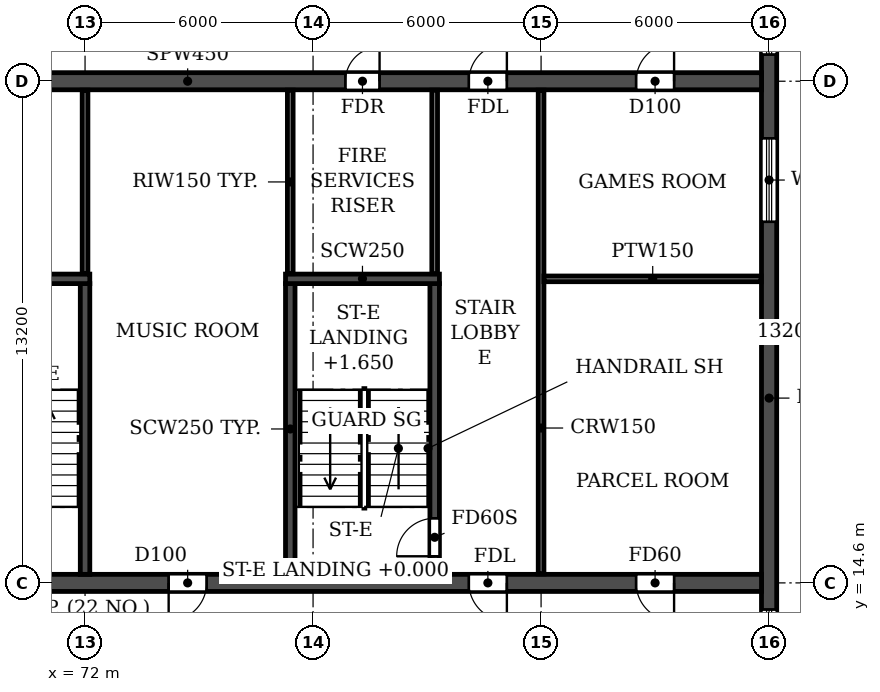
"""IFC4 building model, lengths in metres.
Left out: names, types, materials, properties, quantities, classifications, styles, units other than length and angle.
Written with IfcOpenShell. Run it as: python <this file> out.ifc"""

import sys

from ifc_helpers import new_model, si_unit, direction, frame, frame_2d, origin, place, context, subcontext, project, spatial, rectangle, extrude, element, fill, save


model = new_model("IFC4")
c1 = context("Model", 3, precision=1e-05, world=origin(), true_north=direction((0.0, 1.0)))
c2 = subcontext(c1, "Body", "Model", "MODEL_VIEW")
j1 = project(units=[si_unit("LENGTHUNIT", "METRE"), si_unit("PLANEANGLEUNIT", "RADIAN")], contexts=[c1])
p1 = place(None, origin())
s1 = spatial("IfcSite", under=j1, at=p1, CompositionType="ELEMENT")
p2 = place(p1, origin())
s2 = spatial("IfcBuilding", under=s1, at=p2, CompositionType="ELEMENT")
p3 = place(p2, frame((0.0, 0.0, 152.1)))
s3 = spatial("IfcBuildingStorey", under=s2, at=p3, CompositionType="ELEMENT", Elevation=152.1)
p4 = place(p3, frame((90.0, 4.683, 0.0), z_axis=(0.0, 0.0, 1.0), x_axis=(0.0, 1.0, 0.0)))
e1 = element("IfcWall", 1, at=p4, inside=s3, PredefinedType="SHEAR", context=c2, shape_type="SweptSolid", body=[
    extrude(rectangle(XDim=33.034, YDim=0.4, at=frame_2d((16.517, 0.0))), origin(), (0.0, 0.0, 1.0), 3.07),
])
p5 = place(p4, frame((23.817, 0.0, 0.9)))
e2 = element("IfcOpeningElement", 2, at=p5, cuts=e1, PredefinedType="OPENING", context=c2, shape_type="SweptSolid", body=[
    extrude(rectangle(XDim=1.2, YDim=1.5, at=frame_2d((0.6, 0.75))), frame((0.0, 0.21, 0.0), z_axis=(0.0, -1.0, 0.0), x_axis=(1.0, 0.0, 0.0)), (0.0, 0.0, 1.0), 0.42),
])
p6 = place(p4, frame((8.017, 0.0, 0.9)))
e3 = element("IfcOpeningElement", 3, at=p6, cuts=e1, PredefinedType="OPENING", context=c2, shape_type="SweptSolid", body=[
    extrude(rectangle(XDim=1.2, YDim=1.5, at=frame_2d((0.6, 0.75))), frame((0.0, 0.21, 0.0), z_axis=(0.0, -1.0, 0.0), x_axis=(1.0, 0.0, 0.0)), (0.0, 0.0, 1.0), 0.42),
])
p7 = place(p4, frame((28.293, 0.0, 0.6)))
e4 = element("IfcOpeningElement", 4, at=p7, cuts=e1, PredefinedType="OPENING", context=c2, shape_type="SweptSolid", body=[
    extrude(rectangle(XDim=2.2, YDim=1.8, at=frame_2d((1.1, 0.9))), frame((0.0, 0.21, 0.0), z_axis=(0.0, -1.0, 0.0), x_axis=(1.0, 0.0, 0.0)), (0.0, 0.0, 1.0), 0.42),
])
p8 = place(p4, frame((2.541, 0.0, 0.6)))
e5 = element("IfcOpeningElement", 5, at=p8, cuts=e1, PredefinedType="OPENING", context=c2, shape_type="SweptSolid", body=[
    extrude(rectangle(XDim=2.2, YDim=1.8, at=frame_2d((1.1, 0.9))), frame((0.0, 0.21, 0.0), z_axis=(0.0, -1.0, 0.0), x_axis=(1.0, 0.0, 0.0)), (0.0, 0.0, 1.0), 0.42),
])
p9 = place(p4, frame((19.417, 0.0, 0.6)))
e6 = element("IfcOpeningElement", 6, at=p9, cuts=e1, PredefinedType="OPENING", context=c2, shape_type="SweptSolid", body=[
    extrude(rectangle(XDim=2.2, YDim=1.8, at=frame_2d((1.1, 0.9))), frame((0.0, 0.21, 0.0), z_axis=(0.0, -1.0, 0.0), x_axis=(1.0, 0.0, 0.0)), (0.0, 0.0, 1.0), 0.42),
])
p10 = place(p3, frame((12.2, 14.6, 0.0), z_axis=(0.0, 0.0, 1.0), x_axis=(1.0, 0.0, 0.0)))
e7 = element("IfcWall", 7, at=p10, inside=s3, PredefinedType="SOLIDWALL", context=c2, shape_type="SweptSolid", body=[
    extrude(rectangle(XDim=77.6, YDim=0.45, at=frame_2d((38.8, 0.0))), origin(), (0.0, 0.0, 1.0), 3.07),
])
p11 = place(p10, frame((2.3, 0.0, 0.0)))
e8 = element("IfcOpeningElement", 8, at=p11, cuts=e7, PredefinedType="OPENING", context=c2, shape_type="SweptSolid", body=[
    extrude(rectangle(XDim=1.0, YDim=2.1, at=frame_2d((0.5, 1.05))), frame((0.0, 0.235, 0.0), z_axis=(0.0, -1.0, 0.0), x_axis=(1.0, 0.0, 0.0)), (0.0, 0.0, 1.0), 0.47),
])
p12 = place(p10, frame((6.7, 0.0, 0.0)))
e9 = element("IfcOpeningElement", 9, at=p12, cuts=e7, PredefinedType="OPENING", context=c2, shape_type="SweptSolid", body=[
    extrude(rectangle(XDim=1.0, YDim=2.1, at=frame_2d((0.5, 1.05))), frame((0.0, 0.235, 0.0), z_axis=(0.0, -1.0, 0.0), x_axis=(1.0, 0.0, 0.0)), (0.0, 0.0, 1.0), 0.47),
])
p13 = place(p10, frame((14.6, 0.0, 0.0)))
e10 = element("IfcOpeningElement", 10, at=p13, cuts=e7, PredefinedType="OPENING", context=c2, shape_type="SweptSolid", body=[
    extrude(rectangle(XDim=1.0, YDim=2.1, at=frame_2d((0.5, 1.05))), frame((0.0, 0.235, 0.0), z_axis=(0.0, -1.0, 0.0), x_axis=(1.0, 0.0, 0.0)), (0.0, 0.0, 1.0), 0.47),
])
p14 = place(p10, frame((19.2, 0.0, 0.0)))
e11 = element("IfcOpeningElement", 11, at=p14, cuts=e7, PredefinedType="OPENING", context=c2, shape_type="SweptSolid", body=[
    extrude(rectangle(XDim=1.0, YDim=2.1, at=frame_2d((0.5, 1.05))), frame((0.0, 0.235, 0.0), z_axis=(0.0, -1.0, 0.0), x_axis=(1.0, 0.0, 0.0)), (0.0, 0.0, 1.0), 0.47),
])
p15 = place(p10, frame((30.5, 0.0, 0.0)))
e12 = element("IfcOpeningElement", 12, at=p15, cuts=e7, PredefinedType="OPENING", context=c2, shape_type="SweptSolid", body=[
    extrude(rectangle(XDim=1.0, YDim=2.1, at=frame_2d((0.5, 1.05))), frame((0.0, 0.235, 0.0), z_axis=(0.0, -1.0, 0.0), x_axis=(1.0, 0.0, 0.0)), (0.0, 0.0, 1.0), 0.47),
])
p16 = place(p10, frame((34.15, 0.0, 0.0)))
e13 = element("IfcOpeningElement", 13, at=p16, cuts=e7, PredefinedType="OPENING", context=c2, shape_type="SweptSolid", body=[
    extrude(rectangle(XDim=1.5, YDim=2.1, at=frame_2d((0.75, 1.05))), frame((0.0, 0.235, 0.0), z_axis=(0.0, -1.0, 0.0), x_axis=(1.0, 0.0, 0.0)), (0.0, 0.0, 1.0), 0.47),
])
p17 = place(p10, frame((38.3, 0.0, 0.0)))
e14 = element("IfcOpeningElement", 14, at=p17, cuts=e7, PredefinedType="OPENING", context=c2, shape_type="SweptSolid", body=[
    extrude(rectangle(XDim=1.0, YDim=2.1, at=frame_2d((0.5, 1.05))), frame((0.0, 0.235, 0.0), z_axis=(0.0, -1.0, 0.0), x_axis=(1.0, 0.0, 0.0)), (0.0, 0.0, 1.0), 0.47),
])
p18 = place(p10, frame((43.5, 0.0, 0.0)))
e15 = element("IfcOpeningElement", 15, at=p18, cuts=e7, PredefinedType="OPENING", context=c2, shape_type="SweptSolid", body=[
    extrude(rectangle(XDim=1.0, YDim=2.1, at=frame_2d((0.5, 1.05))), frame((0.0, 0.235, 0.0), z_axis=(0.0, -1.0, 0.0), x_axis=(1.0, 0.0, 0.0)), (0.0, 0.0, 1.0), 0.47),
])
p19 = place(p10, frame((57.4, 0.0, 0.0)))
e16 = element("IfcOpeningElement", 16, at=p19, cuts=e7, PredefinedType="OPENING", context=c2, shape_type="SweptSolid", body=[
    extrude(rectangle(XDim=1.0, YDim=2.1, at=frame_2d((0.5, 1.05))), frame((0.0, 0.235, 0.0), z_axis=(0.0, -1.0, 0.0), x_axis=(1.0, 0.0, 0.0)), (0.0, 0.0, 1.0), 0.47),
])
p20 = place(p10, frame((62.0, 0.0, 0.0)))
e17 = element("IfcOpeningElement", 17, at=p20, cuts=e7, PredefinedType="OPENING", context=c2, shape_type="SweptSolid", body=[
    extrude(rectangle(XDim=1.0, YDim=2.1, at=frame_2d((0.5, 1.05))), frame((0.0, 0.235, 0.0), z_axis=(0.0, -1.0, 0.0), x_axis=(1.0, 0.0, 0.0)), (0.0, 0.0, 1.0), 0.47),
])
p21 = place(p10, frame((69.9, 0.0, 0.0)))
e18 = element("IfcOpeningElement", 18, at=p21, cuts=e7, PredefinedType="OPENING", context=c2, shape_type="SweptSolid", body=[
    extrude(rectangle(XDim=1.0, YDim=2.1, at=frame_2d((0.5, 1.05))), frame((0.0, 0.235, 0.0), z_axis=(0.0, -1.0, 0.0), x_axis=(1.0, 0.0, 0.0)), (0.0, 0.0, 1.0), 0.47),
])
p22 = place(p10, frame((74.3, 0.0, 0.0)))
e19 = element("IfcOpeningElement", 19, at=p22, cuts=e7, PredefinedType="OPENING", context=c2, shape_type="SweptSolid", body=[
    extrude(rectangle(XDim=1.0, YDim=2.1, at=frame_2d((0.5, 1.05))), frame((0.0, 0.235, 0.0), z_axis=(0.0, -1.0, 0.0), x_axis=(1.0, 0.0, 0.0)), (0.0, 0.0, 1.0), 0.47),
])
p23 = place(p3, frame((12.2, 27.8, 0.0), z_axis=(0.0, 0.0, 1.0), x_axis=(1.0, 0.0, 0.0)))
e20 = element("IfcWall", 20, at=p23, inside=s3, PredefinedType="SOLIDWALL", context=c2, shape_type="SweptSolid", body=[
    extrude(rectangle(XDim=77.6, YDim=0.45, at=frame_2d((38.8, 0.0))), origin(), (0.0, 0.0, 1.0), 3.07),
])
p24 = place(p23, frame((2.3, 0.0, 0.0)))
e21 = element("IfcOpeningElement", 21, at=p24, cuts=e20, PredefinedType="OPENING", context=c2, shape_type="SweptSolid", body=[
    extrude(rectangle(XDim=1.0, YDim=2.1, at=frame_2d((0.5, 1.05))), frame((0.0, 0.235, 0.0), z_axis=(0.0, -1.0, 0.0), x_axis=(1.0, 0.0, 0.0)), (0.0, 0.0, 1.0), 0.47),
])
p25 = place(p23, frame((6.7, 0.0, 0.0)))
e22 = element("IfcOpeningElement", 22, at=p25, cuts=e20, PredefinedType="OPENING", context=c2, shape_type="SweptSolid", body=[
    extrude(rectangle(XDim=1.0, YDim=2.1, at=frame_2d((0.5, 1.05))), frame((0.0, 0.235, 0.0), z_axis=(0.0, -1.0, 0.0), x_axis=(1.0, 0.0, 0.0)), (0.0, 0.0, 1.0), 0.47),
])
p26 = place(p23, frame((10.05, 0.0, 0.0)))
e23 = element("IfcOpeningElement", 23, at=p26, cuts=e20, PredefinedType="OPENING", context=c2, shape_type="SweptSolid", body=[
    extrude(rectangle(XDim=0.9, YDim=2.1, at=frame_2d((0.45, 1.05))), frame((0.0, 0.235, 0.0), z_axis=(0.0, -1.0, 0.0), x_axis=(1.0, 0.0, 0.0)), (0.0, 0.0, 1.0), 0.47),
])
p27 = place(p23, frame((19.25, 0.0, 0.0)))
e24 = element("IfcOpeningElement", 24, at=p27, cuts=e20, PredefinedType="OPENING", context=c2, shape_type="SweptSolid", body=[
    extrude(rectangle(XDim=0.9, YDim=2.1, at=frame_2d((0.45, 1.05))), frame((0.0, 0.235, 0.0), z_axis=(0.0, -1.0, 0.0), x_axis=(1.0, 0.0, 0.0)), (0.0, 0.0, 1.0), 0.47),
])
p28 = place(p23, frame((22.4, 0.0, 0.0)))
e25 = element("IfcOpeningElement", 25, at=p28, cuts=e20, PredefinedType="OPENING", context=c2, shape_type="SweptSolid", body=[
    extrude(rectangle(XDim=1.0, YDim=2.1, at=frame_2d((0.5, 1.05))), frame((0.0, 0.235, 0.0), z_axis=(0.0, -1.0, 0.0), x_axis=(1.0, 0.0, 0.0)), (0.0, 0.0, 1.0), 0.47),
])
p29 = place(p23, frame((27.6, 0.0, 0.0)))
e26 = element("IfcOpeningElement", 26, at=p29, cuts=e20, PredefinedType="OPENING", context=c2, shape_type="SweptSolid", body=[
    extrude(rectangle(XDim=1.0, YDim=2.1, at=frame_2d((0.5, 1.05))), frame((0.0, 0.235, 0.0), z_axis=(0.0, -1.0, 0.0), x_axis=(1.0, 0.0, 0.0)), (0.0, 0.0, 1.0), 0.47),
])
p30 = place(p23, frame((35.4, 0.0, 0.0)))
e27 = element("IfcOpeningElement", 27, at=p30, cuts=e20, PredefinedType="OPENING", context=c2, shape_type="SweptSolid", body=[
    extrude(rectangle(XDim=1.0, YDim=2.1, at=frame_2d((0.5, 1.05))), frame((0.0, 0.235, 0.0), z_axis=(0.0, -1.0, 0.0), x_axis=(1.0, 0.0, 0.0)), (0.0, 0.0, 1.0), 0.47),
])
p31 = place(p23, frame((38.3, 0.0, 0.0)))
e28 = element("IfcOpeningElement", 28, at=p31, cuts=e20, PredefinedType="OPENING", context=c2, shape_type="SweptSolid", body=[
    extrude(rectangle(XDim=1.0, YDim=2.1, at=frame_2d((0.5, 1.05))), frame((0.0, 0.235, 0.0), z_axis=(0.0, -1.0, 0.0), x_axis=(1.0, 0.0, 0.0)), (0.0, 0.0, 1.0), 0.47),
])
p32 = place(p23, frame((42.25, 0.0, 0.0)))
e29 = element("IfcOpeningElement", 29, at=p32, cuts=e20, PredefinedType="OPENING", context=c2, shape_type="SweptSolid", body=[
    extrude(rectangle(XDim=1.5, YDim=2.1, at=frame_2d((0.75, 1.05))), frame((0.0, 0.235, 0.0), z_axis=(0.0, -1.0, 0.0), x_axis=(1.0, 0.0, 0.0)), (0.0, 0.0, 1.0), 0.47),
])
p33 = place(p23, frame((47.7, 0.0, 0.0)))
e30 = element("IfcOpeningElement", 30, at=p33, cuts=e20, PredefinedType="OPENING", context=c2, shape_type="SweptSolid", body=[
    extrude(rectangle(XDim=1.0, YDim=2.1, at=frame_2d((0.5, 1.05))), frame((0.0, 0.235, 0.0), z_axis=(0.0, -1.0, 0.0), x_axis=(1.0, 0.0, 0.0)), (0.0, 0.0, 1.0), 0.47),
])
p34 = place(p23, frame((51.6, 0.0, 0.0)))
e31 = element("IfcOpeningElement", 31, at=p34, cuts=e20, PredefinedType="OPENING", context=c2, shape_type="SweptSolid", body=[
    extrude(rectangle(XDim=1.0, YDim=2.1, at=frame_2d((0.5, 1.05))), frame((0.0, 0.235, 0.0), z_axis=(0.0, -1.0, 0.0), x_axis=(1.0, 0.0, 0.0)), (0.0, 0.0, 1.0), 0.47),
])
p35 = place(p23, frame((54.2, 0.0, 0.0)))
e32 = element("IfcOpeningElement", 32, at=p35, cuts=e20, PredefinedType="OPENING", context=c2, shape_type="SweptSolid", body=[
    extrude(rectangle(XDim=1.0, YDim=2.1, at=frame_2d((0.5, 1.05))), frame((0.0, 0.235, 0.0), z_axis=(0.0, -1.0, 0.0), x_axis=(1.0, 0.0, 0.0)), (0.0, 0.0, 1.0), 0.47),
])
p36 = place(p23, frame((57.45, 0.0, 0.0)))
e33 = element("IfcOpeningElement", 33, at=p36, cuts=e20, PredefinedType="OPENING", context=c2, shape_type="SweptSolid", body=[
    extrude(rectangle(XDim=0.9, YDim=2.1, at=frame_2d((0.45, 1.05))), frame((0.0, 0.235, 0.0), z_axis=(0.0, -1.0, 0.0), x_axis=(1.0, 0.0, 0.0)), (0.0, 0.0, 1.0), 0.47),
])
p37 = place(p23, frame((66.65, 0.0, 0.0)))
e34 = element("IfcOpeningElement", 34, at=p37, cuts=e20, PredefinedType="OPENING", context=c2, shape_type="SweptSolid", body=[
    extrude(rectangle(XDim=0.9, YDim=2.1, at=frame_2d((0.45, 1.05))), frame((0.0, 0.235, 0.0), z_axis=(0.0, -1.0, 0.0), x_axis=(1.0, 0.0, 0.0)), (0.0, 0.0, 1.0), 0.47),
])
p38 = place(p23, frame((69.9, 0.0, 0.0)))
e35 = element("IfcOpeningElement", 35, at=p38, cuts=e20, PredefinedType="OPENING", context=c2, shape_type="SweptSolid", body=[
    extrude(rectangle(XDim=1.0, YDim=2.1, at=frame_2d((0.5, 1.05))), frame((0.0, 0.235, 0.0), z_axis=(0.0, -1.0, 0.0), x_axis=(1.0, 0.0, 0.0)), (0.0, 0.0, 1.0), 0.47),
])
p39 = place(p23, frame((74.3, 0.0, 0.0)))
e36 = element("IfcOpeningElement", 36, at=p39, cuts=e20, PredefinedType="OPENING", context=c2, shape_type="SweptSolid", body=[
    extrude(rectangle(XDim=1.0, YDim=2.1, at=frame_2d((0.5, 1.05))), frame((0.0, 0.235, 0.0), z_axis=(0.0, -1.0, 0.0), x_axis=(1.0, 0.0, 0.0)), (0.0, 0.0, 1.0), 0.47),
])
p40 = place(p3, frame((72.0, 14.825, 0.0), z_axis=(0.0, 0.0, 1.0), x_axis=(0.0, 1.0, 0.0)))
e37 = element("IfcWall", 37, at=p40, inside=s3, PredefinedType="SOLIDWALL", context=c2, shape_type="SweptSolid", body=[
    extrude(rectangle(XDim=7.65, YDim=0.25, at=frame_2d((3.825, 0.0))), origin(), (0.0, 0.0, 1.0), 3.07),
])
p41 = place(p3, frame((68.075, 22.6, 0.0), z_axis=(0.0, 0.0, 1.0), x_axis=(1.0, 0.0, 0.0)))
e38 = element("IfcWall", 38, at=p41, inside=s3, PredefinedType="SOLIDWALL", context=c2, shape_type="SweptSolid", body=[
    extrude(rectangle(XDim=4.05, YDim=0.25, at=frame_2d((2.025, 0.0))), origin(), (0.0, 0.0, 1.0), 3.07),
])
p42 = place(p3, frame((77.4, 14.825, 0.0), z_axis=(0.0, 0.0, 1.0), x_axis=(0.0, 1.0, 0.0)))
e39 = element("IfcWall", 39, at=p42, inside=s3, PredefinedType="SOLIDWALL", context=c2, shape_type="SweptSolid", body=[
    extrude(rectangle(XDim=7.65, YDim=0.25, at=frame_2d((3.825, 0.0))), origin(), (0.0, 0.0, 1.0), 3.07),
])
p43 = place(p3, frame((81.2, 14.825, 0.0), z_axis=(0.0, 0.0, 1.0), x_axis=(0.0, 1.0, 0.0)))
e40 = element("IfcWall", 40, at=p43, inside=s3, PredefinedType="SOLIDWALL", context=c2, shape_type="SweptSolid", body=[
    extrude(rectangle(XDim=7.65, YDim=0.25, at=frame_2d((3.825, 0.0))), origin(), (0.0, 0.0, 1.0), 3.07),
])
p44 = place(p43, frame((0.475, 0.0, 0.0)))
e41 = element("IfcOpeningElement", 41, at=p44, cuts=e40, PredefinedType="OPENING", context=c2, shape_type="SweptSolid", body=[
    extrude(rectangle(XDim=1.0, YDim=2.1, at=frame_2d((0.5, 1.05))), frame((0.0, 0.135, 0.0), z_axis=(0.0, -1.0, 0.0), x_axis=(1.0, 0.0, 0.0)), (0.0, 0.0, 1.0), 0.27),
])
p45 = place(p3, frame((77.275, 22.6, 0.0), z_axis=(0.0, 0.0, 1.0), x_axis=(1.0, 0.0, 0.0)))
e42 = element("IfcWall", 42, at=p45, inside=s3, PredefinedType="SOLIDWALL", context=c2, shape_type="SweptSolid", body=[
    extrude(rectangle(XDim=4.05, YDim=0.25, at=frame_2d((2.025, 0.0))), origin(), (0.0, 0.0, 1.0), 3.07),
])
p46 = place(p3, frame((84.0, 14.835, 0.0), z_axis=(0.0, 0.0, 1.0), x_axis=(0.0, 1.0, 0.0)))
e43 = element("IfcWall", 43, at=p46, inside=s3, PredefinedType="PARTITIONING", context=c2, shape_type="SweptSolid", body=[
    extrude(rectangle(XDim=12.73, YDim=0.15, at=frame_2d((6.365, 0.0))), origin(), (0.0, 0.0, 1.0), 3.07),
])
p47 = place(p3, frame((84.075, 22.6, 0.0), z_axis=(0.0, 0.0, 1.0), x_axis=(1.0, 0.0, 0.0)))
e44 = element("IfcWall", 44, at=p47, inside=s3, PredefinedType="PARTITIONING", context=c2, shape_type="SweptSolid", body=[
    extrude(rectangle(XDim=5.715, YDim=0.15, at=frame_2d((2.857, 0.0))), origin(), (0.0, 0.0, 1.0), 3.07),
])
for number, where, z_axis, x_axis in (
    (45, (72.0, 22.735, 0.0), (0.0, 0.0, 1.0), (0.0, 1.0, 0.0)),
    (46, (77.4, 22.735, 0.0), (0.0, 0.0, 1.0), (0.0, 1.0, 0.0)),
    (47, (81.2, 22.735, 0.0), (0.0, 0.0, 1.0), (0.0, 1.0, 0.0)),
):
    element("IfcWall", number, at=place(p3, frame(where, z_axis=z_axis, x_axis=x_axis)), inside=s3, PredefinedType="PARTITIONING", context=c2, shape_type="SweptSolid", body=[
        extrude(rectangle(XDim=4.83, YDim=0.15, at=frame_2d((2.415, 0.0))), origin(), (0.0, 0.0, 1.0), 3.07),
    ])
p48 = place(p5, origin())
e48 = element("IfcWindow", 48, at=p48, inside=s3, PartitioningType="SINGLE_PANEL", PredefinedType="WINDOW", context=c2, shape_type="SweptSolid", body=[
    extrude(rectangle(XDim=1.2, YDim=1.5, at=frame_2d((0.6, 0.75))), frame((0.0, 0.03, 0.0), z_axis=(0.0, -1.0, 0.0), x_axis=(1.0, 0.0, 0.0)), (0.0, 0.0, 1.0), 0.06),
])
fill(e2, e48)
p49 = place(p6, origin())
e49 = element("IfcWindow", 49, at=p49, inside=s3, PartitioningType="SINGLE_PANEL", PredefinedType="WINDOW", context=c2, shape_type="SweptSolid", body=[
    extrude(rectangle(XDim=1.2, YDim=1.5, at=frame_2d((0.6, 0.75))), frame((0.0, 0.03, 0.0), z_axis=(0.0, -1.0, 0.0), x_axis=(1.0, 0.0, 0.0)), (0.0, 0.0, 1.0), 0.06),
])
fill(e3, e49)
p50 = place(p9, origin())
e50 = element("IfcWindow", 50, at=p50, inside=s3, PartitioningType="DOUBLE_PANEL_HORIZONTAL", PredefinedType="WINDOW", context=c2, shape_type="SweptSolid", body=[
    extrude(rectangle(XDim=2.2, YDim=1.8, at=frame_2d((1.1, 0.9))), frame((0.0, 0.03, 0.0), z_axis=(0.0, -1.0, 0.0), x_axis=(1.0, 0.0, 0.0)), (0.0, 0.0, 1.0), 0.06),
])
fill(e6, e50)
p51 = place(p37, origin())
e51 = element("IfcDoor", 51, at=p51, inside=s3, OperationType="SINGLE_SWING_RIGHT", PredefinedType="DOOR", context=c2, shape_type="SweptSolid", body=[
    extrude(rectangle(XDim=0.9, YDim=2.1, at=frame_2d((0.45, 1.05))), frame((0.0, 0.025, 0.0), z_axis=(0.0, -1.0, 0.0), x_axis=(1.0, 0.0, 0.0)), (0.0, 0.0, 1.0), 0.05),
])
fill(e34, e51)
p52 = place(p38, origin())
e52 = element("IfcDoor", 52, at=p52, inside=s3, OperationType="SINGLE_SWING_RIGHT", PredefinedType="DOOR", context=c2, shape_type="SweptSolid", body=[
    extrude(rectangle(XDim=1.0, YDim=2.1, at=frame_2d((0.5, 1.05))), frame((0.0, 0.025, 0.0), z_axis=(0.0, -1.0, 0.0), x_axis=(1.0, 0.0, 0.0)), (0.0, 0.0, 1.0), 0.05),
])
fill(e35, e52)
p53 = place(p39, origin())
e53 = element("IfcDoor", 53, at=p53, inside=s3, OperationType="SINGLE_SWING_RIGHT", PredefinedType="DOOR", context=c2, shape_type="SweptSolid", body=[
    extrude(rectangle(XDim=1.0, YDim=2.1, at=frame_2d((0.5, 1.05))), frame((0.0, 0.025, 0.0), z_axis=(0.0, -1.0, 0.0), x_axis=(1.0, 0.0, 0.0)), (0.0, 0.0, 1.0), 0.05),
])
fill(e36, e53)
p54 = place(p20, frame((1.0, 0.0, 0.0), z_axis=(0.0, 0.0, 1.0), x_axis=(-1.0, 0.0, 0.0)))
e54 = element("IfcDoor", 54, at=p54, inside=s3, OperationType="SINGLE_SWING_RIGHT", PredefinedType="DOOR", context=c2, shape_type="SweptSolid", body=[
    extrude(rectangle(XDim=1.0, YDim=2.1, at=frame_2d((0.5, 1.05))), frame((0.0, 0.025, 0.0), z_axis=(0.0, -1.0, 0.0), x_axis=(1.0, 0.0, 0.0)), (0.0, 0.0, 1.0), 0.05),
])
fill(e17, e54)
p55 = place(p21, frame((1.0, 0.0, 0.0), z_axis=(0.0, 0.0, 1.0), x_axis=(-1.0, 0.0, 0.0)))
e55 = element("IfcDoor", 55, at=p55, inside=s3, OperationType="SINGLE_SWING_LEFT", PredefinedType="DOOR", context=c2, shape_type="SweptSolid", body=[
    extrude(rectangle(XDim=1.0, YDim=2.1, at=frame_2d((0.5, 1.05))), frame((0.0, 0.025, 0.0), z_axis=(0.0, -1.0, 0.0), x_axis=(1.0, 0.0, 0.0)), (0.0, 0.0, 1.0), 0.05),
])
fill(e18, e55)
p56 = place(p22, frame((1.0, 0.0, 0.0), z_axis=(0.0, 0.0, 1.0), x_axis=(-1.0, 0.0, 0.0)))
e56 = element("IfcDoor", 56, at=p56, inside=s3, OperationType="SINGLE_SWING_LEFT", PredefinedType="DOOR", context=c2, shape_type="SweptSolid", body=[
    extrude(rectangle(XDim=1.0, YDim=2.1, at=frame_2d((0.5, 1.05))), frame((0.0, 0.025, 0.0), z_axis=(0.0, -1.0, 0.0), x_axis=(1.0, 0.0, 0.0)), (0.0, 0.0, 1.0), 0.05),
])
fill(e19, e56)
p57 = place(p44, origin())
e57 = element("IfcDoor", 57, at=p57, inside=s3, OperationType="SINGLE_SWING_LEFT", PredefinedType="DOOR", context=c2, shape_type="SweptSolid", body=[
    extrude(rectangle(XDim=1.0, YDim=2.1, at=frame_2d((0.5, 1.05))), frame((0.0, 0.025, 0.0), z_axis=(0.0, -1.0, 0.0), x_axis=(1.0, 0.0, 0.0)), (0.0, 0.0, 1.0), 0.05),
])
fill(e41, e57)
save(model, sys.argv[1])
